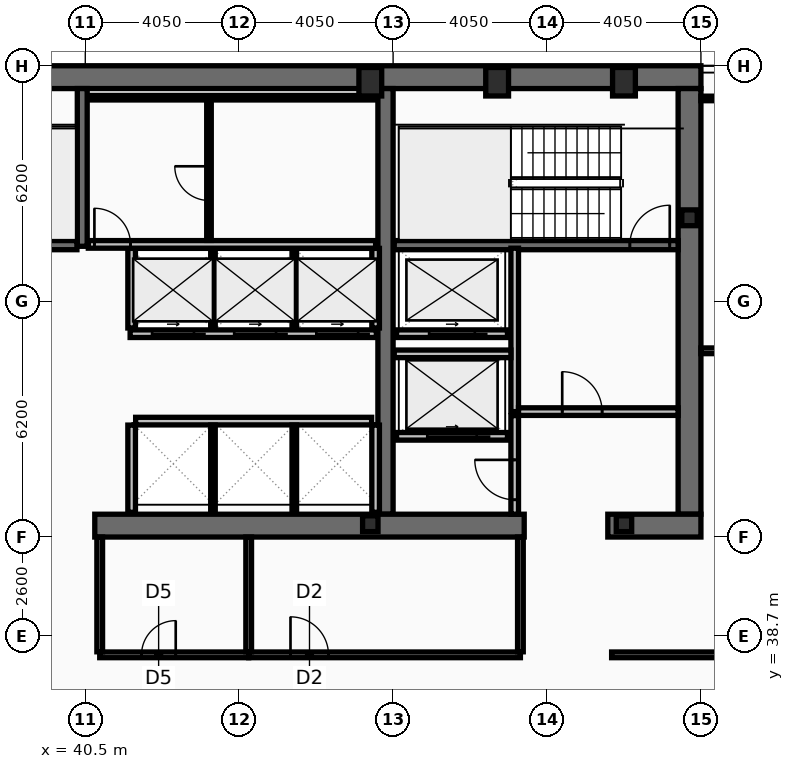
"""IFC4 building model, lengths in metres.
Left out: names, types, materials, properties, quantities, classifications, styles, units other than length and angle.
Written with IfcOpenShell. Run it as: python <this file> out.ifc"""

import sys

from ifc_helpers import new_model, si_unit, direction, frame, frame_2d, origin, origin_2d, place, context, subcontext, project, spatial, rectangle, hollow_rectangle, i_section, extrude, element, fill, save


model = new_model("IFC4")
c1 = context("Model", 3, precision=1e-05, world=origin(), true_north=direction((0.0, 1.0)))
c2 = subcontext(c1, "Body", "Model", "MODEL_VIEW")
j1 = project(units=[si_unit("LENGTHUNIT", "METRE"), si_unit("PLANEANGLEUNIT", "RADIAN")], contexts=[c1])
p1 = place(None, origin())
s1 = spatial("IfcSite", under=j1, at=p1, CompositionType="ELEMENT")
p2 = place(p1, origin())
s2 = spatial("IfcBuilding", under=s1, at=p2, CompositionType="ELEMENT")
p3 = place(p2, frame((0.0, 0.0, 192.2)))
s3 = spatial("IfcBuildingStorey", under=s2, at=p3, CompositionType="ELEMENT", Elevation=192.2)
p4 = place(p3, frame((16.2, 53.4, 0.0), z_axis=(0.0, 0.0, 1.0), x_axis=(1.0, 0.0, 0.0)))
e1 = element("IfcWall", 1, at=p4, inside=s3, PredefinedType="SHEAR", context=c2, shape_type="SweptSolid", body=[
    extrude(rectangle(XDim=40.5, YDim=0.6, at=frame_2d((20.25, 0.0))), origin(), (0.0, 0.0, 1.0), 3.44),
])
p5 = place(p3, frame((56.4, 53.1, 0.0), z_axis=(0.0, 0.0, 1.0), x_axis=(0.0, -1.0, 0.0)))
e2 = element("IfcWall", 2, at=p5, inside=s3, PredefinedType="SHEAR", context=c2, shape_type="SweptSolid", body=[
    extrude(rectangle(XDim=11.2, YDim=0.6, at=frame_2d((5.6, 0.0))), origin(), (0.0, 0.0, 1.0), 3.44),
])
p6 = place(p3, frame((48.4, 41.9, 0.0), z_axis=(0.0, 0.0, 1.0), x_axis=(0.0, 1.0, 0.0)))
e3 = element("IfcWall", 3, at=p6, inside=s3, PredefinedType="SHEAR", context=c2, shape_type="SweptSolid", body=[
    extrude(rectangle(XDim=11.2, YDim=0.4, at=frame_2d((5.6, 0.0))), origin(), (0.0, 0.0, 1.0), 3.44),
])
p7 = place(p3, frame((52.05, 41.6, 0.0), z_axis=(0.0, 0.0, 1.0), x_axis=(-1.0, 0.0, 0.0)))
e4 = element("IfcWall", 4, at=p7, inside=s3, PredefinedType="SHEAR", context=c2, shape_type="SweptSolid", body=[
    extrude(rectangle(XDim=11.3, YDim=0.6, at=frame_2d((5.65, 0.0))), origin(), (0.0, 0.0, 1.0), 3.44),
])
p8 = place(p3, frame((56.7, 41.6, 0.0), z_axis=(0.0, 0.0, 1.0), x_axis=(-1.0, 0.0, 0.0)))
e5 = element("IfcWall", 5, at=p8, inside=s3, PredefinedType="SHEAR", context=c2, shape_type="SweptSolid", body=[
    extrude(rectangle(XDim=2.45, YDim=0.6, at=frame_2d((1.225, 0.0))), origin(), (0.0, 0.0, 1.0), 3.44),
])
p9 = place(p3, frame((40.42, 48.95, 0.0), z_axis=(0.0, 0.0, 1.0), x_axis=(0.0, 1.0, 0.0)))
e6 = element("IfcWall", 6, at=p9, inside=s3, PredefinedType="SHEAR", context=c2, shape_type="SweptSolid", body=[
    extrude(rectangle(XDim=4.15, YDim=0.26, at=frame_2d((2.075, 0.0))), origin(), (0.0, 0.0, 1.0), 3.44),
])
p10 = place(p3, frame((48.63, 48.98, 0.0), z_axis=(0.0, 0.0, 1.0), x_axis=(1.0, 0.0, 0.0)))
e7 = element("IfcWall", 7, at=p10, inside=s3, PredefinedType="SHEAR", context=c2, shape_type="SweptSolid", body=[
    extrude(rectangle(XDim=7.47, YDim=0.24, at=frame_2d((3.735, 0.0))), origin(), (0.0, 0.0, 1.0), 3.44),
])
p11 = place(p10, frame((6.2, 0.0, 0.0)))
e8 = element("IfcOpeningElement", 8, at=p11, cuts=e7, PredefinedType="OPENING", context=c2, shape_type="SweptSolid", body=[
    extrude(rectangle(XDim=1.05, YDim=2.15, at=frame_2d((0.525, 1.075))), frame((0.0, 0.13, 0.0), z_axis=(0.0, -1.0, 0.0), x_axis=(1.0, 0.0, 0.0)), (0.0, 0.0, 1.0), 0.26),
])
p12 = place(p3, frame((32.72, 48.98, 0.0), z_axis=(0.0, 0.0, 1.0), x_axis=(1.0, 0.0, 0.0)))
e9 = element("IfcWall", 9, at=p12, inside=s3, PredefinedType="SHEAR", context=c2, shape_type="SweptSolid", body=[
    extrude(rectangle(XDim=7.56, YDim=0.24, at=frame_2d((3.78, 0.0))), origin(), (0.0, 0.0, 1.0), 3.44),
])
p13 = place(p12, frame((0.22, 0.0, 0.0)))
e10 = element("IfcOpeningElement", 10, at=p13, cuts=e9, PredefinedType="OPENING", context=c2, shape_type="SweptSolid", body=[
    extrude(rectangle(XDim=1.05, YDim=2.15, at=frame_2d((0.525, 1.075))), frame((0.0, 0.13, 0.0), z_axis=(0.0, -1.0, 0.0), x_axis=(1.0, 0.0, 0.0)), (0.0, 0.0, 1.0), 0.26),
])
for number, where, z_axis, x_axis in (
    (11, (48.0, 53.28, 0.0), (0.0, 0.0, 1.0), (1.0, 0.0, 0.0)),
    (12, (51.337, 53.28, 0.0), (0.0, 0.0, 1.0), (1.0, 0.0, 0.0)),
    (13, (54.675, 53.28, 0.0), (0.0, 0.0, 1.0), (1.0, 0.0, 0.0)),
):
    element("IfcColumn", number, at=place(p3, frame(where, z_axis=z_axis, x_axis=x_axis)), inside=s3, PredefinedType="COLUMN", context=c2, shape_type="SweptSolid", body=[
        extrude(hollow_rectangle(XDim=0.6, YDim=0.75, WallThickness=0.045, at=origin_2d()), origin(), (0.0, 0.0, 1.0), 3.6),
    ])
for number, where, z_axis, x_axis in (
    (14, (56.4, 49.7, 0.0), (0.0, 0.0, 1.0), (1.0, 0.0, 0.0)),
    (15, (48.0, 41.65, 0.0), (0.0, 0.0, 1.0), (1.0, 0.0, 0.0)),
    (16, (54.675, 41.65, 0.0), (0.0, 0.0, 1.0), (1.0, 0.0, 0.0)),
):
    element("IfcColumn", number, at=place(p3, frame(where, z_axis=z_axis, x_axis=x_axis)), inside=s3, PredefinedType="COLUMN", context=c2, shape_type="SweptSolid", body=[
        extrude(i_section(OverallWidth=0.406, OverallDepth=0.416, WebThickness=0.03, FlangeThickness=0.048, at=origin_2d()), origin(), (0.0, 0.0, 1.0), 3.6),
    ])
p14 = place(p3, frame((51.61, 43.95, 0.0), z_axis=(0.0, 0.0, 1.0), x_axis=(-1.0, 0.0, 0.0)))
e17 = element("IfcWall", 17, at=p14, inside=s3, PredefinedType="PARTITIONING", context=c2, shape_type="SweptSolid", body=[
    extrude(rectangle(XDim=2.92, YDim=0.2, at=frame_2d((1.46, 0.0))), origin(), (0.0, 0.0, 1.0), 3.44),
])
p15 = place(p14, frame((0.81, 0.0, 0.0)))
e18 = element("IfcOpeningElement", 18, at=p15, cuts=e17, PredefinedType="OPENING", context=c2, shape_type="SweptSolid", body=[
    extrude(rectangle(XDim=1.3, YDim=2.18, at=frame_2d((0.65, 1.09))), frame((0.0, 0.11, 0.0), z_axis=(0.0, -1.0, 0.0), x_axis=(1.0, 0.0, 0.0)), (0.0, 0.0, 1.0), 0.22),
])
p16 = place(p3, frame((51.61, 46.65, 0.0), z_axis=(0.0, 0.0, 1.0), x_axis=(-1.0, 0.0, 0.0)))
e19 = element("IfcWall", 19, at=p16, inside=s3, PredefinedType="PARTITIONING", context=c2, shape_type="SweptSolid", body=[
    extrude(rectangle(XDim=2.92, YDim=0.2, at=frame_2d((1.46, 0.0))), origin(), (0.0, 0.0, 1.0), 3.44),
])
p17 = place(p16, frame((0.86, 0.0, 0.0)))
e20 = element("IfcOpeningElement", 20, at=p17, cuts=e19, PredefinedType="OPENING", context=c2, shape_type="SweptSolid", body=[
    extrude(rectangle(XDim=1.2, YDim=2.18, at=frame_2d((0.6, 1.09))), frame((0.0, 0.11, 0.0), z_axis=(0.0, -1.0, 0.0), x_axis=(1.0, 0.0, 0.0)), (0.0, 0.0, 1.0), 0.22),
])
p18 = place(p3, frame((48.16, 46.65, 0.0), z_axis=(0.0, 0.0, 1.0), x_axis=(-1.0, 0.0, 0.0)))
e21 = element("IfcWall", 21, at=p18, inside=s3, PredefinedType="PARTITIONING", context=c2, shape_type="SweptSolid", body=[
    extrude(rectangle(XDim=6.48, YDim=0.2, at=frame_2d((3.24, 0.0))), origin(), (0.0, 0.0, 1.0), 3.44),
])
p19 = place(p18, frame((4.8, 0.0, 0.0)))
e22 = element("IfcOpeningElement", 22, at=p19, cuts=e21, PredefinedType="OPENING", context=c2, shape_type="SweptSolid", body=[
    extrude(rectangle(XDim=1.1, YDim=2.18, at=frame_2d((0.55, 1.09))), frame((0.0, 0.11, 0.0), z_axis=(0.0, -1.0, 0.0), x_axis=(1.0, 0.0, 0.0)), (0.0, 0.0, 1.0), 0.22),
])
p20 = place(p18, frame((2.64, 0.0, 0.0)))
e23 = element("IfcOpeningElement", 23, at=p20, cuts=e21, PredefinedType="OPENING", context=c2, shape_type="SweptSolid", body=[
    extrude(rectangle(XDim=1.1, YDim=2.18, at=frame_2d((0.55, 1.09))), frame((0.0, 0.11, 0.0), z_axis=(0.0, -1.0, 0.0), x_axis=(1.0, 0.0, 0.0)), (0.0, 0.0, 1.0), 0.22),
])
p21 = place(p18, frame((0.48, 0.0, 0.0)))
e24 = element("IfcOpeningElement", 24, at=p21, cuts=e21, PredefinedType="OPENING", context=c2, shape_type="SweptSolid", body=[
    extrude(rectangle(XDim=1.1, YDim=2.18, at=frame_2d((0.55, 1.09))), frame((0.0, 0.11, 0.0), z_axis=(0.0, -1.0, 0.0), x_axis=(1.0, 0.0, 0.0)), (0.0, 0.0, 1.0), 0.22),
])
p22 = place(p3, frame((51.8, 44.6, 0.0), z_axis=(0.0, 0.0, 1.0), x_axis=(0.0, 1.0, 0.0)))
e25 = element("IfcWall", 25, at=p22, inside=s3, PredefinedType="PARTITIONING", context=c2, shape_type="SweptSolid", body=[
    extrude(rectangle(XDim=4.3, YDim=0.2, at=frame_2d((2.15, 0.0))), origin(), (0.0, 0.0, 1.0), 3.44),
])
p23 = place(p3, frame((51.9, 44.6, 0.0), z_axis=(0.0, 0.0, 1.0), x_axis=(1.0, 0.0, 0.0)))
e26 = element("IfcWall", 26, at=p23, inside=s3, PredefinedType="PARTITIONING", context=c2, shape_type="SweptSolid", body=[
    extrude(rectangle(XDim=4.2, YDim=0.2, at=frame_2d((2.1, 0.0))), origin(), (0.0, 0.0, 1.0), 3.44),
])
p24 = place(p23, frame((1.15, 0.0, 0.0)))
e27 = element("IfcOpeningElement", 27, at=p24, cuts=e26, PredefinedType="OPENING", context=c2, shape_type="SweptSolid", body=[
    extrude(rectangle(XDim=1.05, YDim=2.15, at=frame_2d((0.525, 1.075))), frame((0.0, 0.11, 0.0), z_axis=(0.0, -1.0, 0.0), x_axis=(1.0, 0.0, 0.0)), (0.0, 0.0, 1.0), 0.22),
])
p25 = place(p3, frame((48.63, 46.12, 0.0), z_axis=(0.0, 0.0, 1.0), x_axis=(1.0, 0.0, 0.0)))
e28 = element("IfcWall", 28, at=p25, inside=s3, PredefinedType="PARTITIONING", context=c2, shape_type="SweptSolid", body=[
    extrude(rectangle(XDim=3.07, YDim=0.2, at=frame_2d((1.535, 0.0))), origin(), (0.0, 0.0, 1.0), 3.44),
])
p26 = place(p3, frame((51.8, 41.9, 0.0), z_axis=(0.0, 0.0, 1.0), x_axis=(0.0, 1.0, 0.0)))
e29 = element("IfcWall", 29, at=p26, inside=s3, PredefinedType="PARTITIONING", context=c2, shape_type="SweptSolid", body=[
    extrude(rectangle(XDim=2.595, YDim=0.2, at=frame_2d((1.298, 0.0))), origin(), (0.0, 0.0, 1.0), 3.44),
])
p27 = place(p26, frame((0.38, 0.0, 0.0)))
e30 = element("IfcOpeningElement", 30, at=p27, cuts=e29, PredefinedType="OPENING", context=c2, shape_type="SweptSolid", body=[
    extrude(rectangle(XDim=1.05, YDim=2.15, at=frame_2d((0.525, 1.075))), frame((0.0, 0.11, 0.0), z_axis=(0.0, -1.0, 0.0), x_axis=(1.0, 0.0, 0.0)), (0.0, 0.0, 1.0), 0.22),
])
for number, where, z_axis, x_axis in (
    (31, (41.72, 46.8, 0.0), (0.0, 0.0, 1.0), (0.0, 1.0, 0.0)),
    (32, (48.14, 46.8, 0.0), (0.0, 0.0, 1.0), (0.0, 1.0, 0.0)),
):
    element("IfcWall", number, at=place(p3, frame(where, z_axis=z_axis, x_axis=x_axis)), inside=s3, PredefinedType="PARTITIONING", context=c2, shape_type="SweptSolid", body=[
        extrude(rectangle(XDim=2.095, YDim=0.2, at=frame_2d((1.047, 0.0))), origin(), (0.0, 0.0, 1.0), 3.44),
    ])
for number, where, z_axis, x_axis in (
    (33, (43.86, 46.8, 0.0), (0.0, 0.0, 1.0), (0.0, 1.0, 0.0)),
    (34, (46.0, 46.8, 0.0), (0.0, 0.0, 1.0), (0.0, 1.0, 0.0)),
):
    element("IfcWall", number, at=place(p3, frame(where, z_axis=z_axis, x_axis=x_axis)), inside=s3, PredefinedType="PARTITIONING", context=c2, shape_type="SweptSolid", body=[
        extrude(rectangle(XDim=2.095, YDim=0.12, at=frame_2d((1.047, 0.0))), origin(), (0.0, 0.0, 1.0), 3.44),
    ])
p28 = place(p3, frame((41.825, 44.35, 0.0), z_axis=(0.0, 0.0, 1.0), x_axis=(1.0, 0.0, 0.0)))
e35 = element("IfcWall", 35, at=p28, inside=s3, PredefinedType="PARTITIONING", context=c2, shape_type="SweptSolid", body=[
    extrude(rectangle(XDim=6.21, YDim=0.2, at=frame_2d((3.105, 0.0))), origin(), (0.0, 0.0, 1.0), 3.44),
])
for number, where, z_axis, x_axis in (
    (36, (41.72, 41.95, 0.0), (0.0, 0.0, 1.0), (0.0, 1.0, 0.0)),
    (37, (48.14, 41.95, 0.0), (0.0, 0.0, 1.0), (0.0, 1.0, 0.0)),
):
    element("IfcWall", number, at=place(p3, frame(where, z_axis=z_axis, x_axis=x_axis)), inside=s3, PredefinedType="PARTITIONING", context=c2, shape_type="SweptSolid", body=[
        extrude(rectangle(XDim=2.295, YDim=0.2, at=frame_2d((1.147, 0.0))), origin(), (0.0, 0.0, 1.0), 3.44),
    ])
for number, where, z_axis, x_axis in (
    (38, (43.86, 41.95, 0.0), (0.0, 0.0, 1.0), (0.0, 1.0, 0.0)),
    (39, (46.0, 41.95, 0.0), (0.0, 0.0, 1.0), (0.0, 1.0, 0.0)),
):
    element("IfcWall", number, at=place(p3, frame(where, z_axis=z_axis, x_axis=x_axis)), inside=s3, PredefinedType="PARTITIONING", context=c2, shape_type="SweptSolid", body=[
        extrude(rectangle(XDim=2.295, YDim=0.12, at=frame_2d((1.147, 0.0))), origin(), (0.0, 0.0, 1.0), 3.44),
    ])
p29 = place(p3, frame((40.58, 52.86, 0.0), z_axis=(0.0, 0.0, 1.0), x_axis=(1.0, 0.0, 0.0)))
e40 = element("IfcWall", 40, at=p29, inside=s3, PredefinedType="PARTITIONING", context=c2, shape_type="SweptSolid", body=[
    extrude(rectangle(XDim=7.56, YDim=0.12, at=frame_2d((3.78, 0.0))), origin(), (0.0, 0.0, 1.0), 3.44),
])
p30 = place(p3, frame((40.58, 49.0, 0.0), z_axis=(0.0, 0.0, 1.0), x_axis=(1.0, 0.0, 0.0)))
e41 = element("IfcWall", 41, at=p30, inside=s3, PredefinedType="PARTITIONING", context=c2, shape_type="SweptSolid", body=[
    extrude(rectangle(XDim=7.56, YDim=0.2, at=frame_2d((3.78, 0.0))), origin(), (0.0, 0.0, 1.0), 3.44),
])
p31 = place(p30, frame((0.16, 0.0, 0.0)))
e42 = element("IfcOpeningElement", 42, at=p31, cuts=e41, PredefinedType="OPENING", context=c2, shape_type="SweptSolid", body=[
    extrude(rectangle(XDim=0.95, YDim=2.1, at=frame_2d((0.475, 1.05))), frame((0.0, 0.11, 0.0), z_axis=(0.0, -1.0, 0.0), x_axis=(1.0, 0.0, 0.0)), (0.0, 0.0, 1.0), 0.22),
])
p32 = place(p3, frame((43.755, 49.105, 0.0), z_axis=(0.0, 0.0, 1.0), x_axis=(0.0, 1.0, 0.0)))
e43 = element("IfcWall", 43, at=p32, inside=s3, PredefinedType="PARTITIONING", context=c2, shape_type="SweptSolid", body=[
    extrude(rectangle(XDim=3.69, YDim=0.12, at=frame_2d((1.845, 0.0))), origin(), (0.0, 0.0, 1.0), 3.44),
])
p33 = place(p32, frame((1.05, 0.0, 0.0)))
e44 = element("IfcOpeningElement", 44, at=p33, cuts=e43, PredefinedType="OPENING", context=c2, shape_type="SweptSolid", body=[
    extrude(rectangle(XDim=0.9, YDim=2.05, at=frame_2d((0.45, 1.025))), frame((0.0, 0.07, 0.0), z_axis=(0.0, -1.0, 0.0), x_axis=(1.0, 0.0, 0.0)), (0.0, 0.0, 1.0), 0.14),
])
p34 = place(p3, frame((40.88, 38.2, 0.0), z_axis=(0.0, 0.0, 1.0), x_axis=(1.0, 0.0, 0.0)))
e45 = element("IfcWall", 45, at=p34, inside=s3, PredefinedType="PARTITIONING", context=c2, shape_type="SweptSolid", body=[
    extrude(rectangle(XDim=3.92, YDim=0.15, at=frame_2d((1.96, 0.0))), origin(), (0.0, 0.0, 1.0), 2.73),
])
p35 = place(p34, frame((1.1, 0.0, 0.0)))
e46 = element("IfcOpeningElement", 46, at=p35, cuts=e45, PredefinedType="OPENING", context=c2, shape_type="SweptSolid", body=[
    extrude(rectangle(XDim=0.9, YDim=2.05, at=frame_2d((0.45, 1.025))), frame((0.0, 0.085, 0.0), z_axis=(0.0, -1.0, 0.0), x_axis=(1.0, 0.0, 0.0)), (0.0, 0.0, 1.0), 0.17),
])
p36 = place(p3, frame((44.8, 38.2, 0.0), z_axis=(0.0, 0.0, 1.0), x_axis=(1.0, 0.0, 0.0)))
e47 = element("IfcWall", 47, at=p36, inside=s3, PredefinedType="PARTITIONING", context=c2, shape_type="SweptSolid", body=[
    extrude(rectangle(XDim=7.15, YDim=0.15, at=frame_2d((3.575, 0.0))), origin(), (0.0, 0.0, 1.0), 2.73),
])
p37 = place(p36, frame((1.1, 0.0, 0.0)))
e48 = element("IfcOpeningElement", 48, at=p37, cuts=e47, PredefinedType="OPENING", context=c2, shape_type="SweptSolid", body=[
    extrude(rectangle(XDim=1.0, YDim=2.05, at=frame_2d((0.5, 1.025))), frame((0.0, 0.085, 0.0), z_axis=(0.0, -1.0, 0.0), x_axis=(1.0, 0.0, 0.0)), (0.0, 0.0, 1.0), 0.17),
])
for number, where, z_axis, x_axis in (
    (49, (40.88, 38.28, 0.0), (0.0, 0.0, 1.0), (0.0, 1.0, 0.0)),
    (50, (44.8, 38.28, 0.0), (0.0, 0.0, 1.0), (0.0, 1.0, 0.0)),
    (51, (51.95, 38.28, 0.0), (0.0, 0.0, 1.0), (0.0, 1.0, 0.0)),
):
    element("IfcWall", number, at=place(p3, frame(where, z_axis=z_axis, x_axis=x_axis)), inside=s3, PredefinedType="PARTITIONING", context=c2, shape_type="SweptSolid", body=[
        extrude(rectangle(XDim=3.02, YDim=0.15, at=frame_2d((1.51, 0.0))), origin(), (0.0, 0.0, 1.0), 3.44),
    ])
p38 = place(p3, frame((54.35, 38.2, 0.0), z_axis=(0.0, 0.0, 1.0), x_axis=(1.0, 0.0, 0.0)))
e52 = element("IfcWall", 52, at=p38, inside=s3, PredefinedType="PARTITIONING", context=c2, shape_type="SweptSolid", body=[
    extrude(rectangle(XDim=10.52, YDim=0.15, at=frame_2d((5.26, 0.0))), origin(), (0.0, 0.0, 1.0), 2.73),
])
p39 = place(p38, frame((3.25, 0.0, 0.0)))
e53 = element("IfcOpeningElement", 53, at=p39, cuts=e52, PredefinedType="OPENING", context=c2, shape_type="SweptSolid", body=[
    extrude(rectangle(XDim=0.95, YDim=2.05, at=frame_2d((0.475, 1.025))), frame((0.0, 0.085, 0.0), z_axis=(0.0, -1.0, 0.0), x_axis=(1.0, 0.0, 0.0)), (0.0, 0.0, 1.0), 0.17),
])
p40 = place(p3, frame((56.7, 46.2, 0.0), z_axis=(0.0, 0.0, 1.0), x_axis=(1.0, 0.0, 0.0)))
e54 = element("IfcWall", 54, at=p40, inside=s3, PredefinedType="PARTITIONING", context=c2, shape_type="SweptSolid", body=[
    extrude(rectangle(XDim=8.105, YDim=0.15, at=frame_2d((4.052, 0.0))), origin(), (0.0, 0.0, 1.0), 2.83),
])
p41 = place(p40, frame((0.9, 0.0, 0.0)))
e55 = element("IfcOpeningElement", 55, at=p41, cuts=e54, PredefinedType="OPENING", context=c2, shape_type="SweptSolid", body=[
    extrude(rectangle(XDim=0.9, YDim=2.05, at=frame_2d((0.45, 1.025))), frame((0.0, 0.085, 0.0), z_axis=(0.0, -1.0, 0.0), x_axis=(1.0, 0.0, 0.0)), (0.0, 0.0, 1.0), 0.17),
])
p42 = place(p3, frame((56.7, 52.84, 0.0), z_axis=(0.0, 0.0, 1.0), x_axis=(1.0, 0.0, 0.0)))
e56 = element("IfcWall", 56, at=p42, inside=s3, PredefinedType="PARTITIONING", context=c2, shape_type="SweptSolid", body=[
    extrude(rectangle(XDim=8.105, YDim=0.12, at=frame_2d((4.052, 0.0))), origin(), (0.0, 0.0, 1.0), 3.44),
])
p43 = place(p11, origin())
e57 = element("IfcDoor", 57, at=p43, inside=s3, OperationType="SINGLE_SWING_RIGHT", PredefinedType="DOOR", context=c2, shape_type="SweptSolid", body=[
    extrude(rectangle(XDim=1.05, YDim=2.15, at=frame_2d((0.525, 1.075))), frame((0.0, 0.025, 0.0), z_axis=(0.0, -1.0, 0.0), x_axis=(1.0, 0.0, 0.0)), (0.0, 0.0, 1.0), 0.05),
])
fill(e8, e57)
p44 = place(p15, origin())
e58 = element("IfcDoor", 58, at=p44, inside=s3, OperationType="SLIDING_TO_LEFT", PredefinedType="DOOR", context=c2, shape_type="SweptSolid", body=[
    extrude(rectangle(XDim=1.3, YDim=2.18, at=frame_2d((0.65, 1.09))), frame((0.0, 0.025, 0.0), z_axis=(0.0, -1.0, 0.0), x_axis=(1.0, 0.0, 0.0)), (0.0, 0.0, 1.0), 0.05),
])
fill(e18, e58)
p45 = place(p17, origin())
e59 = element("IfcDoor", 59, at=p45, inside=s3, OperationType="SLIDING_TO_LEFT", PredefinedType="DOOR", context=c2, shape_type="SweptSolid", body=[
    extrude(rectangle(XDim=1.2, YDim=2.18, at=frame_2d((0.6, 1.09))), frame((0.0, 0.025, 0.0), z_axis=(0.0, -1.0, 0.0), x_axis=(1.0, 0.0, 0.0)), (0.0, 0.0, 1.0), 0.05),
])
fill(e20, e59)
p46 = place(p19, origin())
e60 = element("IfcDoor", 60, at=p46, inside=s3, OperationType="SLIDING_TO_LEFT", PredefinedType="DOOR", context=c2, shape_type="SweptSolid", body=[
    extrude(rectangle(XDim=1.1, YDim=2.18, at=frame_2d((0.55, 1.09))), frame((0.0, 0.025, 0.0), z_axis=(0.0, -1.0, 0.0), x_axis=(1.0, 0.0, 0.0)), (0.0, 0.0, 1.0), 0.05),
])
fill(e22, e60)
p47 = place(p20, origin())
e61 = element("IfcDoor", 61, at=p47, inside=s3, OperationType="SLIDING_TO_LEFT", PredefinedType="DOOR", context=c2, shape_type="SweptSolid", body=[
    extrude(rectangle(XDim=1.1, YDim=2.18, at=frame_2d((0.55, 1.09))), frame((0.0, 0.025, 0.0), z_axis=(0.0, -1.0, 0.0), x_axis=(1.0, 0.0, 0.0)), (0.0, 0.0, 1.0), 0.05),
])
fill(e23, e61)
p48 = place(p21, origin())
e62 = element("IfcDoor", 62, at=p48, inside=s3, OperationType="SLIDING_TO_LEFT", PredefinedType="DOOR", context=c2, shape_type="SweptSolid", body=[
    extrude(rectangle(XDim=1.1, YDim=2.18, at=frame_2d((0.55, 1.09))), frame((0.0, 0.025, 0.0), z_axis=(0.0, -1.0, 0.0), x_axis=(1.0, 0.0, 0.0)), (0.0, 0.0, 1.0), 0.05),
])
fill(e24, e62)
p49 = place(p24, origin())
e63 = element("IfcDoor", 63, at=p49, inside=s3, OperationType="SINGLE_SWING_LEFT", PredefinedType="DOOR", context=c2, shape_type="SweptSolid", body=[
    extrude(rectangle(XDim=1.05, YDim=2.15, at=frame_2d((0.525, 1.075))), frame((0.0, 0.025, 0.0), z_axis=(0.0, -1.0, 0.0), x_axis=(1.0, 0.0, 0.0)), (0.0, 0.0, 1.0), 0.05),
])
fill(e27, e63)
p50 = place(p27, origin())
e64 = element("IfcDoor", 64, at=p50, inside=s3, OperationType="SINGLE_SWING_RIGHT", PredefinedType="DOOR", context=c2, shape_type="SweptSolid", body=[
    extrude(rectangle(XDim=1.05, YDim=2.15, at=frame_2d((0.525, 1.075))), frame((0.0, 0.025, 0.0), z_axis=(0.0, -1.0, 0.0), x_axis=(1.0, 0.0, 0.0)), (0.0, 0.0, 1.0), 0.05),
])
fill(e30, e64)
p51 = place(p31, origin())
e65 = element("IfcDoor", 65, at=p51, inside=s3, OperationType="SINGLE_SWING_LEFT", PredefinedType="DOOR", context=c2, shape_type="SweptSolid", body=[
    extrude(rectangle(XDim=0.95, YDim=2.1, at=frame_2d((0.475, 1.05))), frame((0.0, 0.025, 0.0), z_axis=(0.0, -1.0, 0.0), x_axis=(1.0, 0.0, 0.0)), (0.0, 0.0, 1.0), 0.05),
])
fill(e42, e65)
p52 = place(p33, origin())
e66 = element("IfcDoor", 66, at=p52, inside=s3, OperationType="SINGLE_SWING_RIGHT", PredefinedType="DOOR", context=c2, shape_type="SweptSolid", body=[
    extrude(rectangle(XDim=0.9, YDim=2.05, at=frame_2d((0.45, 1.025))), frame((0.0, 0.025, 0.0), z_axis=(0.0, -1.0, 0.0), x_axis=(1.0, 0.0, 0.0)), (0.0, 0.0, 1.0), 0.05),
])
fill(e44, e66)
p53 = place(p35, origin())
e67 = element("IfcDoor", 67, at=p53, inside=s3, OperationType="SINGLE_SWING_RIGHT", PredefinedType="DOOR", context=c2, shape_type="SweptSolid", body=[
    extrude(rectangle(XDim=0.9, YDim=2.05, at=frame_2d((0.45, 1.025))), frame((0.0, 0.025, 0.0), z_axis=(0.0, -1.0, 0.0), x_axis=(1.0, 0.0, 0.0)), (0.0, 0.0, 1.0), 0.05),
])
fill(e46, e67)
p54 = place(p37, origin())
e68 = element("IfcDoor", 68, at=p54, inside=s3, OperationType="SINGLE_SWING_LEFT", PredefinedType="DOOR", context=c2, shape_type="SweptSolid", body=[
    extrude(rectangle(XDim=1.0, YDim=2.05, at=frame_2d((0.5, 1.025))), frame((0.0, 0.025, 0.0), z_axis=(0.0, -1.0, 0.0), x_axis=(1.0, 0.0, 0.0)), (0.0, 0.0, 1.0), 0.05),
])
fill(e48, e68)
save(model, sys.argv[1])
